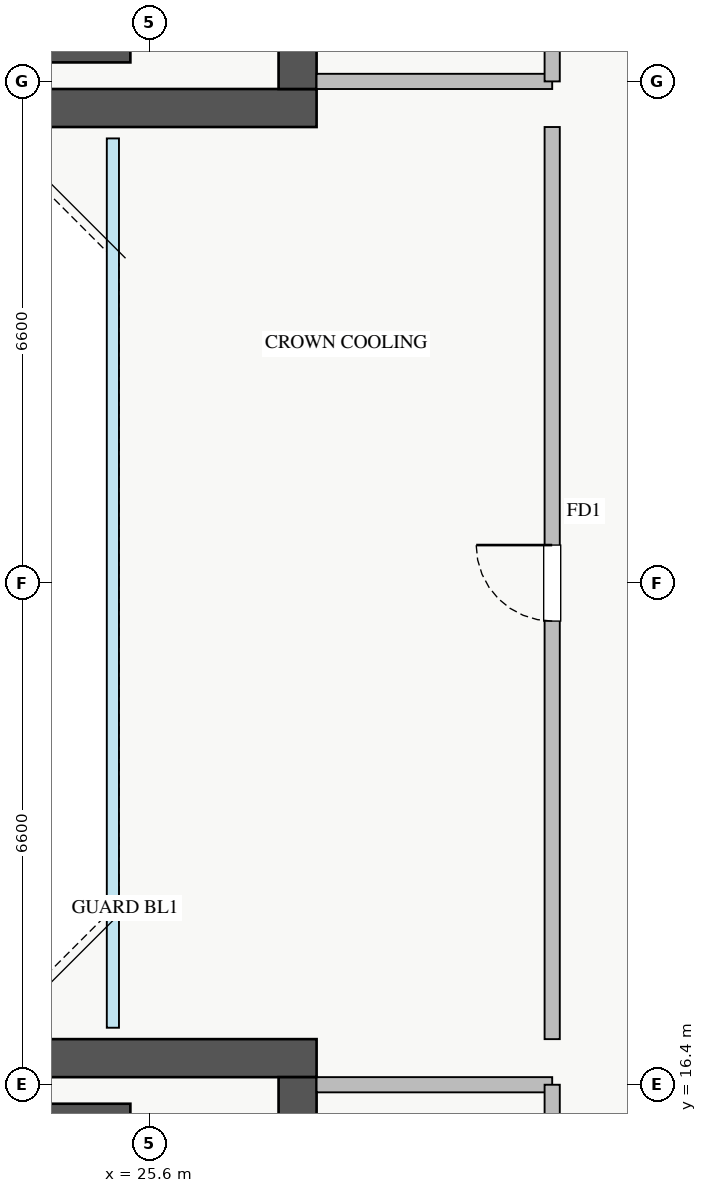
"""IFC4 building model, lengths in metres.
Left out: names, types, materials, properties, quantities, classifications, styles, units other than length and angle.
Written with IfcOpenShell. Run it as: python <this file> out.ifc"""

import sys

from ifc_helpers import new_model, si_unit, direction, frame, frame_2d, origin, place, context, subcontext, project, spatial, rectangle, extrude, source, transform, mapped, element, fill, save


model = new_model("IFC4")
c1 = context("Model", 3, precision=1e-05, world=origin(), true_north=direction((0.0, 1.0)))
c2 = subcontext(c1, "Body", "Model", "MODEL_VIEW")
j1 = project(units=[si_unit("LENGTHUNIT", "METRE"), si_unit("PLANEANGLEUNIT", "RADIAN")], contexts=[c1])
p1 = place(None, origin())
s1 = spatial("IfcSite", under=j1, at=p1, CompositionType="ELEMENT")
p2 = place(p1, origin())
s2 = spatial("IfcBuilding", under=s1, at=p2, CompositionType="ELEMENT")
p3 = place(p2, frame((0.0, 0.0, 263.25)))
s3 = spatial("IfcBuildingStorey", under=s2, at=p3, CompositionType="ELEMENT", Elevation=263.25)
for number, where, z_axis, x_axis in (
    (1, (18.2, 29.95, 0.0), (0.0, 0.0, 1.0), (1.0, 0.0, 0.0)),
    (2, (18.2, 16.05, 0.0), (0.0, 0.0, 1.0), (1.0, 0.0, 0.0)),
):
    element("IfcWall", number, at=place(p3, frame(where, z_axis=z_axis, x_axis=x_axis)), inside=s3, PredefinedType="SHEAR", context=c2, shape_type="SweptSolid", body=[
        extrude(rectangle(XDim=7.15, YDim=0.2, at=frame_2d((3.575, 0.0))), origin(), (0.0, 0.0, 1.0), 4.5),
    ])
p4 = place(p3, frame((10.2, 29.25, 0.0), z_axis=(0.0, 0.0, 1.0), x_axis=(1.0, 0.0, 0.0)))
e3 = element("IfcWall", 3, at=p4, inside=s3, PredefinedType="SHEAR", context=c2, shape_type="SweptSolid", body=[
    extrude(rectangle(XDim=17.6, YDim=0.5, at=frame_2d((8.8, 0.0))), origin(), (0.0, 0.0, 1.0), 4.5),
])
p5 = place(p3, frame((27.55, 29.5, 0.0), z_axis=(0.0, 0.0, 1.0), x_axis=(0.0, 1.0, 0.0)))
e4 = element("IfcWall", 4, at=p5, inside=s3, PredefinedType="SHEAR", context=c2, shape_type="SweptSolid", body=[
    extrude(rectangle(XDim=6.2, YDim=0.5, at=frame_2d((3.1, 0.0))), origin(), (0.0, 0.0, 1.0), 4.5),
])
p6 = place(p5, frame((1.1, 0.0, 0.0)))
e5 = element("IfcOpeningElement", 5, at=p6, cuts=e4, PredefinedType="OPENING", context=c2, shape_type="SweptSolid", body=[
    extrude(rectangle(XDim=1.3, YDim=2.05, at=frame_2d((0.65, 1.025))), frame((0.0, 0.26, 0.0), z_axis=(0.0, -1.0, 0.0), x_axis=(1.0, 0.0, 0.0)), (0.0, 0.0, 1.0), 0.52),
])
p7 = place(p3, frame((10.2, 16.75, 0.0), z_axis=(0.0, 0.0, 1.0), x_axis=(1.0, 0.0, 0.0)))
e6 = element("IfcWall", 6, at=p7, inside=s3, PredefinedType="SHEAR", context=c2, shape_type="SweptSolid", body=[
    extrude(rectangle(XDim=17.6, YDim=0.5, at=frame_2d((8.8, 0.0))), origin(), (0.0, 0.0, 1.0), 4.5),
])
p8 = place(p3, frame((27.55, 10.3, 0.0), z_axis=(0.0, 0.0, 1.0), x_axis=(0.0, 1.0, 0.0)))
e7 = element("IfcWall", 7, at=p8, inside=s3, PredefinedType="SHEAR", context=c2, shape_type="SweptSolid", body=[
    extrude(rectangle(XDim=6.2, YDim=0.5, at=frame_2d((3.1, 0.0))), origin(), (0.0, 0.0, 1.0), 4.5),
])
p9 = place(p8, frame((2.1, 0.0, 0.0)))
e8 = element("IfcOpeningElement", 8, at=p9, cuts=e7, PredefinedType="OPENING", context=c2, shape_type="SweptSolid", body=[
    extrude(rectangle(XDim=1.3, YDim=2.05, at=frame_2d((0.65, 1.025))), frame((0.0, 0.26, 0.0), z_axis=(0.0, -1.0, 0.0), x_axis=(1.0, 0.0, 0.0)), (0.0, 0.0, 1.0), 0.52),
])
p10 = place(p3, frame((27.8, 29.6, 0.0), z_axis=(0.0, 0.0, 1.0), x_axis=(1.0, 0.0, 0.0)))
e9 = element("IfcWall", 9, at=p10, inside=s3, PredefinedType="PARTITIONING", context=c2, shape_type="SweptSolid", body=[
    extrude(rectangle(XDim=3.1, YDim=0.2, at=frame_2d((1.55, 0.0))), origin(), (0.0, 0.0, 1.0), 4.25),
])
p11 = place(p3, frame((30.9, 29.6, 0.0), z_axis=(0.0, 0.0, 1.0), x_axis=(0.0, 1.0, 0.0)))
e10 = element("IfcWall", 10, at=p11, inside=s3, PredefinedType="PARTITIONING", context=c2, shape_type="SweptSolid", body=[
    extrude(rectangle(XDim=3.9, YDim=0.2, at=frame_2d((1.95, 0.0))), origin(), (0.0, 0.0, 1.0), 4.045),
])
p12 = place(p11, frame((1.4, 0.0, 0.0)))
e11 = element("IfcOpeningElement", 11, at=p12, cuts=e10, PredefinedType="OPENING", context=c2, shape_type="SweptSolid", body=[
    extrude(rectangle(XDim=1.1, YDim=2.05, at=frame_2d((0.55, 1.025))), frame((0.0, 0.11, 0.0), z_axis=(0.0, -1.0, 0.0), x_axis=(1.0, 0.0, 0.0)), (0.0, 0.0, 1.0), 0.22),
])
p13 = place(p3, frame((27.8, 16.4, 0.0), z_axis=(0.0, 0.0, 1.0), x_axis=(1.0, 0.0, 0.0)))
e12 = element("IfcWall", 12, at=p13, inside=s3, PredefinedType="PARTITIONING", context=c2, shape_type="SweptSolid", body=[
    extrude(rectangle(XDim=3.1, YDim=0.2, at=frame_2d((1.55, 0.0))), origin(), (0.0, 0.0, 1.0), 4.25),
])
p14 = place(p3, frame((30.9, 12.5, 0.0), z_axis=(0.0, 0.0, 1.0), x_axis=(0.0, 1.0, 0.0)))
e13 = element("IfcWall", 13, at=p14, inside=s3, PredefinedType="PARTITIONING", context=c2, shape_type="SweptSolid", body=[
    extrude(rectangle(XDim=3.9, YDim=0.2, at=frame_2d((1.95, 0.0))), origin(), (0.0, 0.0, 1.0), 4.045),
])
p15 = place(p14, frame((1.4, 0.0, 0.0)))
e14 = element("IfcOpeningElement", 14, at=p15, cuts=e13, PredefinedType="OPENING", context=c2, shape_type="SweptSolid", body=[
    extrude(rectangle(XDim=1.1, YDim=2.05, at=frame_2d((0.55, 1.025))), frame((0.0, 0.11, 0.0), z_axis=(0.0, -1.0, 0.0), x_axis=(1.0, 0.0, 0.0)), (0.0, 0.0, 1.0), 0.22),
])
p16 = place(p3, frame((30.9, 17.0, 0.0), z_axis=(0.0, 0.0, 1.0), x_axis=(0.0, 1.0, 0.0)))
e15 = element("IfcWall", 15, at=p16, inside=s3, PredefinedType="PARTITIONING", context=c2, shape_type="SweptSolid", body=[
    extrude(rectangle(XDim=12.0, YDim=0.2, at=frame_2d((6.0, 0.0))), origin(), (0.0, 0.0, 1.0), 4.045),
])
p17 = place(p16, frame((5.5, 0.0, 0.0)))
e16 = element("IfcOpeningElement", 16, at=p17, cuts=e15, PredefinedType="OPENING", context=c2, shape_type="SweptSolid", body=[
    extrude(rectangle(XDim=1.0, YDim=2.05, at=frame_2d((0.5, 1.025))), frame((0.0, 0.11, 0.0), z_axis=(0.0, -1.0, 0.0), x_axis=(1.0, 0.0, 0.0)), (0.0, 0.0, 1.0), 0.22),
])
m1 = source(origin(), c2, "Body", "SweptSolid", [
    extrude(rectangle(XDim=1.0, YDim=2.05, at=frame_2d((0.5, 1.025))), frame((0.0, 0.025, 0.0), z_axis=(0.0, -1.0, 0.0), x_axis=(1.0, 0.0, 0.0)), (0.0, 0.0, 1.0), 0.05),
])
p18 = place(p17, origin())
e17 = element("IfcDoor", 17, at=p18, inside=s3, OperationType="SINGLE_SWING_RIGHT", PredefinedType="DOOR", context=c2, shape_type="MappedRepresentation", body=[
    mapped(m1, transform((0.0, 0.0, 0.0), x_axis=(1.0, 0.0, 0.0), y_axis=(0.0, 1.0, 0.0), z_axis=(0.0, 0.0, 1.0), scale=1.0)),
])
fill(e16, e17)
save(model, sys.argv[1])
